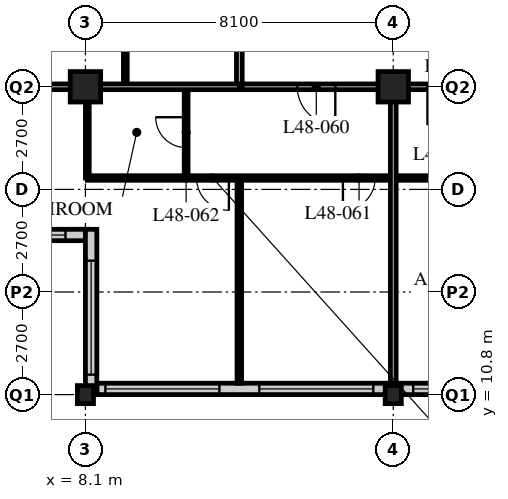
"""IFC4 building model, lengths in metres.
Left out: names, types, materials, properties, quantities, classifications, styles, units other than length and angle.
Written with IfcOpenShell. Run it as: python <this file> out.ifc"""

import sys

from ifc_helpers import new_model, si_unit, direction, frame, frame_2d, origin, origin_2d, place, context, subcontext, project, spatial, rectangle, hollow_rectangle, i_section, extrude, element, fill, save


model = new_model("IFC4")
c1 = context("Model", 3, precision=1e-05, world=origin(), true_north=direction((0.0, 1.0)))
c2 = subcontext(c1, "Body", "Model", "MODEL_VIEW")
j1 = project(units=[si_unit("LENGTHUNIT", "METRE"), si_unit("PLANEANGLEUNIT", "RADIAN")], contexts=[c1])
p1 = place(None, origin())
s1 = spatial("IfcSite", under=j1, at=p1, CompositionType="ELEMENT")
p2 = place(p1, origin())
s2 = spatial("IfcBuilding", under=s1, at=p2, CompositionType="ELEMENT")
p3 = place(p2, frame((0.0, 0.0, 188.4)))
s3 = spatial("IfcBuildingStorey", under=s2, at=p3, CompositionType="ELEMENT", Elevation=188.4)
p4 = place(p3, frame((8.1, 10.8, 0.0), z_axis=(0.0, 0.0, 1.0), x_axis=(1.0, 0.0, 0.0)))
e1 = element("IfcColumn", 1, at=p4, inside=s3, PredefinedType="COLUMN", context=c2, shape_type="SweptSolid", body=[
    extrude(i_section(OverallWidth=0.424, OverallDepth=0.475, WebThickness=0.048, FlangeThickness=0.077, FilletRadius=0.015, at=origin_2d()), origin(), (0.0, 0.0, 1.0), 3.6),
])
p5 = place(p3, frame((8.1, 18.9, 0.0), z_axis=(0.0, 0.0, 1.0), x_axis=(1.0, 0.0, 0.0)))
e2 = element("IfcColumn", 2, at=p5, inside=s3, PredefinedType="COLUMN", context=c2, shape_type="SweptSolid", body=[
    extrude(hollow_rectangle(XDim=0.8, YDim=0.8, WallThickness=0.08, at=origin_2d()), origin(), (0.0, 0.0, 1.0), 3.6),
])
p6 = place(p3, frame((16.2, 10.8, 0.0), z_axis=(0.0, 0.0, 1.0), x_axis=(1.0, 0.0, 0.0)))
e3 = element("IfcColumn", 3, at=p6, inside=s3, PredefinedType="COLUMN", context=c2, shape_type="SweptSolid", body=[
    extrude(i_section(OverallWidth=0.424, OverallDepth=0.475, WebThickness=0.048, FlangeThickness=0.077, FilletRadius=0.015, at=origin_2d()), origin(), (0.0, 0.0, 1.0), 3.6),
])
p7 = place(p3, frame((16.2, 18.9, 0.0), z_axis=(0.0, 0.0, 1.0), x_axis=(1.0, 0.0, 0.0)))
e4 = element("IfcColumn", 4, at=p7, inside=s3, PredefinedType="COLUMN", context=c2, shape_type="SweptSolid", body=[
    extrude(hollow_rectangle(XDim=0.8, YDim=0.8, WallThickness=0.08, at=origin_2d()), origin(), (0.0, 0.0, 1.0), 3.6),
])
p8 = place(p3, frame((8.4, 10.95, 0.0), z_axis=(0.0, 0.0, 1.0), x_axis=(1.0, 0.0, 0.0)))
e5 = element("IfcWall", 5, at=p8, inside=s3, PredefinedType="SOLIDWALL", context=c2, shape_type="SweptSolid", body=[
    extrude(rectangle(XDim=40.2, YDim=0.3, at=frame_2d((20.1, 0.0))), origin(), (0.0, 0.0, 1.0), 3.39),
])
p9 = place(p8, frame((0.225, 0.0, 0.6)))
e6 = element("IfcOpeningElement", 6, at=p9, cuts=e5, PredefinedType="OPENING", context=c2, shape_type="SweptSolid", body=[
    extrude(rectangle(XDim=3.0, YDim=2.4, at=frame_2d((1.5, 1.2))), frame((0.0, 0.16, 0.0), z_axis=(0.0, -1.0, 0.0), x_axis=(1.0, 0.0, 0.0)), (0.0, 0.0, 1.0), 0.32),
])
p10 = place(p8, frame((4.275, 0.0, 0.6)))
e7 = element("IfcOpeningElement", 7, at=p10, cuts=e5, PredefinedType="OPENING", context=c2, shape_type="SweptSolid", body=[
    extrude(rectangle(XDim=3.0, YDim=2.4, at=frame_2d((1.5, 1.2))), frame((0.0, 0.16, 0.0), z_axis=(0.0, -1.0, 0.0), x_axis=(1.0, 0.0, 0.0)), (0.0, 0.0, 1.0), 0.32),
])
p11 = place(p8, frame((8.325, 0.0, 0.6)))
e8 = element("IfcOpeningElement", 8, at=p11, cuts=e5, PredefinedType="OPENING", context=c2, shape_type="SweptSolid", body=[
    extrude(rectangle(XDim=3.0, YDim=2.4, at=frame_2d((1.5, 1.2))), frame((0.0, 0.16, 0.0), z_axis=(0.0, -1.0, 0.0), x_axis=(1.0, 0.0, 0.0)), (0.0, 0.0, 1.0), 0.32),
])
p12 = place(p8, frame((12.375, 0.0, 0.6)))
e9 = element("IfcOpeningElement", 9, at=p12, cuts=e5, PredefinedType="OPENING", context=c2, shape_type="SweptSolid", body=[
    extrude(rectangle(XDim=3.0, YDim=2.4, at=frame_2d((1.5, 1.2))), frame((0.0, 0.16, 0.0), z_axis=(0.0, -1.0, 0.0), x_axis=(1.0, 0.0, 0.0)), (0.0, 0.0, 1.0), 0.32),
])
p13 = place(p8, frame((16.425, 0.0, 0.6)))
e10 = element("IfcOpeningElement", 10, at=p13, cuts=e5, PredefinedType="OPENING", context=c2, shape_type="SweptSolid", body=[
    extrude(rectangle(XDim=3.0, YDim=2.4, at=frame_2d((1.5, 1.2))), frame((0.0, 0.16, 0.0), z_axis=(0.0, -1.0, 0.0), x_axis=(1.0, 0.0, 0.0)), (0.0, 0.0, 1.0), 0.32),
])
p14 = place(p8, frame((20.475, 0.0, 0.6)))
e11 = element("IfcOpeningElement", 11, at=p14, cuts=e5, PredefinedType="OPENING", context=c2, shape_type="SweptSolid", body=[
    extrude(rectangle(XDim=3.0, YDim=2.4, at=frame_2d((1.5, 1.2))), frame((0.0, 0.16, 0.0), z_axis=(0.0, -1.0, 0.0), x_axis=(1.0, 0.0, 0.0)), (0.0, 0.0, 1.0), 0.32),
])
p15 = place(p8, frame((24.525, 0.0, 0.6)))
e12 = element("IfcOpeningElement", 12, at=p15, cuts=e5, PredefinedType="OPENING", context=c2, shape_type="SweptSolid", body=[
    extrude(rectangle(XDim=3.0, YDim=2.4, at=frame_2d((1.5, 1.2))), frame((0.0, 0.16, 0.0), z_axis=(0.0, -1.0, 0.0), x_axis=(1.0, 0.0, 0.0)), (0.0, 0.0, 1.0), 0.32),
])
p16 = place(p8, frame((28.575, 0.0, 0.6)))
e13 = element("IfcOpeningElement", 13, at=p16, cuts=e5, PredefinedType="OPENING", context=c2, shape_type="SweptSolid", body=[
    extrude(rectangle(XDim=3.0, YDim=2.4, at=frame_2d((1.5, 1.2))), frame((0.0, 0.16, 0.0), z_axis=(0.0, -1.0, 0.0), x_axis=(1.0, 0.0, 0.0)), (0.0, 0.0, 1.0), 0.32),
])
p17 = place(p8, frame((32.625, 0.0, 0.6)))
e14 = element("IfcOpeningElement", 14, at=p17, cuts=e5, PredefinedType="OPENING", context=c2, shape_type="SweptSolid", body=[
    extrude(rectangle(XDim=3.0, YDim=2.4, at=frame_2d((1.5, 1.2))), frame((0.0, 0.16, 0.0), z_axis=(0.0, -1.0, 0.0), x_axis=(1.0, 0.0, 0.0)), (0.0, 0.0, 1.0), 0.32),
])
p18 = place(p8, frame((36.675, 0.0, 0.6)))
e15 = element("IfcOpeningElement", 15, at=p18, cuts=e5, PredefinedType="OPENING", context=c2, shape_type="SweptSolid", body=[
    extrude(rectangle(XDim=3.0, YDim=2.4, at=frame_2d((1.5, 1.2))), frame((0.0, 0.16, 0.0), z_axis=(0.0, -1.0, 0.0), x_axis=(1.0, 0.0, 0.0)), (0.0, 0.0, 1.0), 0.32),
])
p19 = place(p3, frame((4.35, 15.0, 0.0), z_axis=(0.0, 0.0, 1.0), x_axis=(1.0, 0.0, 0.0)))
e16 = element("IfcWall", 16, at=p19, inside=s3, PredefinedType="SOLIDWALL", context=c2, shape_type="SweptSolid", body=[
    extrude(rectangle(XDim=3.75, YDim=0.3, at=frame_2d((1.875, 0.0))), origin(), (0.0, 0.0, 1.0), 3.39),
])
p20 = place(p19, frame((0.225, 0.0, 0.6)))
e17 = element("IfcOpeningElement", 17, at=p20, cuts=e16, PredefinedType="OPENING", context=c2, shape_type="SweptSolid", body=[
    extrude(rectangle(XDim=3.0, YDim=2.0, at=frame_2d((1.5, 1.0))), frame((0.0, 0.16, 0.0), z_axis=(0.0, -1.0, 0.0), x_axis=(1.0, 0.0, 0.0)), (0.0, 0.0, 1.0), 0.32),
])
p21 = place(p3, frame((8.25, 15.15, 0.0), z_axis=(0.0, 0.0, 1.0), x_axis=(0.0, -1.0, 0.0)))
e18 = element("IfcWall", 18, at=p21, inside=s3, PredefinedType="SOLIDWALL", context=c2, shape_type="SweptSolid", body=[
    extrude(rectangle(XDim=4.35, YDim=0.3, at=frame_2d((2.175, 0.0))), origin(), (0.0, 0.0, 1.0), 3.39),
])
p22 = place(p21, frame((0.825, 0.0, 0.6)))
e19 = element("IfcOpeningElement", 19, at=p22, cuts=e18, PredefinedType="OPENING", context=c2, shape_type="SweptSolid", body=[
    extrude(rectangle(XDim=3.0, YDim=2.0, at=frame_2d((1.5, 1.0))), frame((0.0, 0.16, 0.0), z_axis=(0.0, -1.0, 0.0), x_axis=(1.0, 0.0, 0.0)), (0.0, 0.0, 1.0), 0.32),
])
p23 = place(p3, frame((12.15, 18.9, 0.0), z_axis=(0.0, 0.0, 1.0), x_axis=(1.0, 0.0, 0.0)))
e20 = element("IfcWall", 20, at=p23, inside=s3, PredefinedType="PARTITIONING", context=c2, shape_type="SweptSolid", body=[
    extrude(rectangle(XDim=32.4, YDim=0.15, at=frame_2d((16.2, 0.0))), origin(), (0.0, 0.0, 1.0), 2.778),
])
p24 = place(p23, frame((4.95, 0.0, 0.0)))
e21 = element("IfcOpeningElement", 21, at=p24, cuts=e20, PredefinedType="OPENING", context=c2, shape_type="SweptSolid", body=[
    extrude(rectangle(XDim=1.0, YDim=2.1, at=frame_2d((0.5, 1.05))), frame((0.0, 0.085, 0.0), z_axis=(0.0, -1.0, 0.0), x_axis=(1.0, 0.0, 0.0)), (0.0, 0.0, 1.0), 0.17),
])
p25 = place(p23, frame((13.05, 0.0, 0.0)))
e22 = element("IfcOpeningElement", 22, at=p25, cuts=e20, PredefinedType="OPENING", context=c2, shape_type="SweptSolid", body=[
    extrude(rectangle(XDim=1.0, YDim=2.1, at=frame_2d((0.5, 1.05))), frame((0.0, 0.085, 0.0), z_axis=(0.0, -1.0, 0.0), x_axis=(1.0, 0.0, 0.0)), (0.0, 0.0, 1.0), 0.17),
])
p26 = place(p23, frame((21.15, 0.0, 0.0)))
e23 = element("IfcOpeningElement", 23, at=p26, cuts=e20, PredefinedType="OPENING", context=c2, shape_type="SweptSolid", body=[
    extrude(rectangle(XDim=1.0, YDim=2.1, at=frame_2d((0.5, 1.05))), frame((0.0, 0.085, 0.0), z_axis=(0.0, -1.0, 0.0), x_axis=(1.0, 0.0, 0.0)), (0.0, 0.0, 1.0), 0.17),
])
p27 = place(p23, frame((1.525, 0.0, 0.0)))
e24 = element("IfcOpeningElement", 24, at=p27, cuts=e20, PredefinedType="OPENING", context=c2, shape_type="SweptSolid", body=[
    extrude(rectangle(XDim=1.0, YDim=2.1, at=frame_2d((0.5, 1.05))), frame((0.0, 0.085, 0.0), z_axis=(0.0, -1.0, 0.0), x_axis=(1.0, 0.0, 0.0)), (0.0, 0.0, 1.0), 0.17),
])
p28 = place(p23, frame((29.875, 0.0, 0.0)))
e25 = element("IfcOpeningElement", 25, at=p28, cuts=e20, PredefinedType="OPENING", context=c2, shape_type="SweptSolid", body=[
    extrude(rectangle(XDim=1.0, YDim=2.1, at=frame_2d((0.5, 1.05))), frame((0.0, 0.085, 0.0), z_axis=(0.0, -1.0, 0.0), x_axis=(1.0, 0.0, 0.0)), (0.0, 0.0, 1.0), 0.17),
])
p29 = place(p3, frame((12.15, 18.9, 0.0), z_axis=(0.0, 0.0, 1.0), x_axis=(0.0, 1.0, 0.0)))
e26 = element("IfcWall", 26, at=p29, inside=s3, PredefinedType="PARTITIONING", context=c2, shape_type="SweptSolid", body=[
    extrude(rectangle(XDim=28.35, YDim=0.15, at=frame_2d((14.175, 0.0))), origin(), (0.0, 0.0, 1.0), 3.39),
])
p30 = place(p29, frame((2.35, 0.0, 0.0)))
e27 = element("IfcOpeningElement", 27, at=p30, cuts=e26, PredefinedType="OPENING", context=c2, shape_type="SweptSolid", body=[
    extrude(rectangle(XDim=1.0, YDim=2.1, at=frame_2d((0.5, 1.05))), frame((0.0, 0.085, 0.0), z_axis=(0.0, -1.0, 0.0), x_axis=(1.0, 0.0, 0.0)), (0.0, 0.0, 1.0), 0.17),
])
p31 = place(p29, frame((6.4, 0.0, 0.0)))
e28 = element("IfcOpeningElement", 28, at=p31, cuts=e26, PredefinedType="OPENING", context=c2, shape_type="SweptSolid", body=[
    extrude(rectangle(XDim=1.0, YDim=2.1, at=frame_2d((0.5, 1.05))), frame((0.0, 0.085, 0.0), z_axis=(0.0, -1.0, 0.0), x_axis=(1.0, 0.0, 0.0)), (0.0, 0.0, 1.0), 0.17),
])
p32 = place(p29, frame((8.5, 0.0, 0.0)))
e29 = element("IfcOpeningElement", 29, at=p32, cuts=e26, PredefinedType="OPENING", context=c2, shape_type="SweptSolid", body=[
    extrude(rectangle(XDim=1.0, YDim=2.1, at=frame_2d((0.5, 1.05))), frame((0.0, 0.085, 0.0), z_axis=(0.0, -1.0, 0.0), x_axis=(1.0, 0.0, 0.0)), (0.0, 0.0, 1.0), 0.17),
])
p33 = place(p29, frame((16.6, 0.0, 0.0)))
e30 = element("IfcOpeningElement", 30, at=p33, cuts=e26, PredefinedType="OPENING", context=c2, shape_type="SweptSolid", body=[
    extrude(rectangle(XDim=1.0, YDim=2.1, at=frame_2d((0.5, 1.05))), frame((0.0, 0.085, 0.0), z_axis=(0.0, -1.0, 0.0), x_axis=(1.0, 0.0, 0.0)), (0.0, 0.0, 1.0), 0.17),
])
p34 = place(p29, frame((26.65, 0.0, 0.0)))
e31 = element("IfcOpeningElement", 31, at=p34, cuts=e26, PredefinedType="OPENING", context=c2, shape_type="SweptSolid", body=[
    extrude(rectangle(XDim=1.0, YDim=2.1, at=frame_2d((0.5, 1.05))), frame((0.0, 0.085, 0.0), z_axis=(0.0, -1.0, 0.0), x_axis=(1.0, 0.0, 0.0)), (0.0, 0.0, 1.0), 0.17),
])
p35 = place(p3, frame((9.15, 18.9, 0.0), z_axis=(0.0, 0.0, 1.0), x_axis=(0.0, 1.0, 0.0)))
e32 = element("IfcWall", 32, at=p35, inside=s3, PredefinedType="PARTITIONING", context=c2, shape_type="SweptSolid", body=[
    extrude(rectangle(XDim=2.2, YDim=0.1, at=frame_2d((1.1, 0.0))), origin(), (0.0, 0.0, 1.0), 3.39),
])
p36 = place(p3, frame((10.75, 18.9, 0.0), z_axis=(0.0, 0.0, 1.0), x_axis=(0.0, -1.0, 0.0)))
e33 = element("IfcWall", 33, at=p36, inside=s3, PredefinedType="PARTITIONING", context=c2, shape_type="SweptSolid", body=[
    extrude(rectangle(XDim=2.4, YDim=0.1, at=frame_2d((1.2, 0.0))), origin(), (0.0, 0.0, 1.0), 3.39),
])
p37 = place(p36, frame((0.8, 0.0, 0.0)))
e34 = element("IfcOpeningElement", 34, at=p37, cuts=e33, PredefinedType="OPENING", context=c2, shape_type="SweptSolid", body=[
    extrude(rectangle(XDim=0.8, YDim=2.1, at=frame_2d((0.4, 1.05))), frame((0.0, 0.06, 0.0), z_axis=(0.0, -1.0, 0.0), x_axis=(1.0, 0.0, 0.0)), (0.0, 0.0, 1.0), 0.12),
])
p38 = place(p3, frame((8.15, 18.9, 0.0), z_axis=(0.0, 0.0, 1.0), x_axis=(0.0, -1.0, 0.0)))
e35 = element("IfcWall", 35, at=p38, inside=s3, PredefinedType="PARTITIONING", context=c2, shape_type="SweptSolid", body=[
    extrude(rectangle(XDim=2.4, YDim=0.1, at=frame_2d((1.2, 0.0))), origin(), (0.0, 0.0, 1.0), 2.778),
])
p39 = place(p3, frame((8.15, 16.5, 0.0), z_axis=(0.0, 0.0, 1.0), x_axis=(1.0, 0.0, 0.0)))
e36 = element("IfcWall", 36, at=p39, inside=s3, PredefinedType="PARTITIONING", context=c2, shape_type="SweptSolid", body=[
    extrude(rectangle(XDim=40.4, YDim=0.12, at=frame_2d((20.2, 0.0))), origin(), (0.0, 0.0, 1.0), 3.39),
])
p40 = place(p39, frame((9.025, 0.0, 0.0)))
e37 = element("IfcOpeningElement", 37, at=p40, cuts=e36, PredefinedType="OPENING", context=c2, shape_type="SweptSolid", body=[
    extrude(rectangle(XDim=0.85, YDim=2.1, at=frame_2d((0.425, 1.05))), frame((0.0, 0.07, 0.0), z_axis=(0.0, -1.0, 0.0), x_axis=(1.0, 0.0, 0.0)), (0.0, 0.0, 1.0), 0.14),
])
p41 = place(p39, frame((12.425, 0.0, 0.0)))
e38 = element("IfcOpeningElement", 38, at=p41, cuts=e36, PredefinedType="OPENING", context=c2, shape_type="SweptSolid", body=[
    extrude(rectangle(XDim=0.85, YDim=2.1, at=frame_2d((0.425, 1.05))), frame((0.0, 0.07, 0.0), z_axis=(0.0, -1.0, 0.0), x_axis=(1.0, 0.0, 0.0)), (0.0, 0.0, 1.0), 0.14),
])
p42 = place(p39, frame((17.125, 0.0, 0.0)))
e39 = element("IfcOpeningElement", 39, at=p42, cuts=e36, PredefinedType="OPENING", context=c2, shape_type="SweptSolid", body=[
    extrude(rectangle(XDim=0.85, YDim=2.1, at=frame_2d((0.425, 1.05))), frame((0.0, 0.07, 0.0), z_axis=(0.0, -1.0, 0.0), x_axis=(1.0, 0.0, 0.0)), (0.0, 0.0, 1.0), 0.14),
])
p43 = place(p39, frame((20.525, 0.0, 0.0)))
e40 = element("IfcOpeningElement", 40, at=p43, cuts=e36, PredefinedType="OPENING", context=c2, shape_type="SweptSolid", body=[
    extrude(rectangle(XDim=0.85, YDim=2.1, at=frame_2d((0.425, 1.05))), frame((0.0, 0.07, 0.0), z_axis=(0.0, -1.0, 0.0), x_axis=(1.0, 0.0, 0.0)), (0.0, 0.0, 1.0), 0.14),
])
p44 = place(p39, frame((25.225, 0.0, 0.0)))
e41 = element("IfcOpeningElement", 41, at=p44, cuts=e36, PredefinedType="OPENING", context=c2, shape_type="SweptSolid", body=[
    extrude(rectangle(XDim=0.85, YDim=2.1, at=frame_2d((0.425, 1.05))), frame((0.0, 0.07, 0.0), z_axis=(0.0, -1.0, 0.0), x_axis=(1.0, 0.0, 0.0)), (0.0, 0.0, 1.0), 0.14),
])
p45 = place(p39, frame((28.625, 0.0, 0.0)))
e42 = element("IfcOpeningElement", 42, at=p45, cuts=e36, PredefinedType="OPENING", context=c2, shape_type="SweptSolid", body=[
    extrude(rectangle(XDim=0.85, YDim=2.1, at=frame_2d((0.425, 1.05))), frame((0.0, 0.07, 0.0), z_axis=(0.0, -1.0, 0.0), x_axis=(1.0, 0.0, 0.0)), (0.0, 0.0, 1.0), 0.14),
])
p46 = place(p39, frame((6.725, 0.0, 0.0)))
e43 = element("IfcOpeningElement", 43, at=p46, cuts=e36, PredefinedType="OPENING", context=c2, shape_type="SweptSolid", body=[
    extrude(rectangle(XDim=0.85, YDim=2.1, at=frame_2d((0.425, 1.05))), frame((0.0, 0.07, 0.0), z_axis=(0.0, -1.0, 0.0), x_axis=(1.0, 0.0, 0.0)), (0.0, 0.0, 1.0), 0.14),
])
p47 = place(p39, frame((2.875, 0.0, 0.0)))
e44 = element("IfcOpeningElement", 44, at=p47, cuts=e36, PredefinedType="OPENING", context=c2, shape_type="SweptSolid", body=[
    extrude(rectangle(XDim=0.85, YDim=2.1, at=frame_2d((0.425, 1.05))), frame((0.0, 0.07, 0.0), z_axis=(0.0, -1.0, 0.0), x_axis=(1.0, 0.0, 0.0)), (0.0, 0.0, 1.0), 0.14),
])
p48 = place(p39, frame((32.825, 0.0, 0.0)))
e45 = element("IfcOpeningElement", 45, at=p48, cuts=e36, PredefinedType="OPENING", context=c2, shape_type="SweptSolid", body=[
    extrude(rectangle(XDim=0.85, YDim=2.1, at=frame_2d((0.425, 1.05))), frame((0.0, 0.07, 0.0), z_axis=(0.0, -1.0, 0.0), x_axis=(1.0, 0.0, 0.0)), (0.0, 0.0, 1.0), 0.14),
])
p49 = place(p39, frame((36.675, 0.0, 0.0)))
e46 = element("IfcOpeningElement", 46, at=p49, cuts=e36, PredefinedType="OPENING", context=c2, shape_type="SweptSolid", body=[
    extrude(rectangle(XDim=0.85, YDim=2.1, at=frame_2d((0.425, 1.05))), frame((0.0, 0.07, 0.0), z_axis=(0.0, -1.0, 0.0), x_axis=(1.0, 0.0, 0.0)), (0.0, 0.0, 1.0), 0.14),
])
p50 = place(p3, frame((12.15, 16.5, 0.0), z_axis=(0.0, 0.0, 1.0), x_axis=(0.0, -1.0, 0.0)))
e47 = element("IfcWall", 47, at=p50, inside=s3, PredefinedType="PARTITIONING", context=c2, shape_type="SweptSolid", body=[
    extrude(rectangle(XDim=5.4, YDim=0.12, at=frame_2d((2.7, 0.0))), origin(), (0.0, 0.0, 1.0), 3.39),
])
for number, where, z_axis, x_axis in (
    (48, (4.35, 18.9, 0.0), (0.0, 0.0, 1.0), (1.0, 0.0, 0.0)),
    (49, (16.2, 18.9, 0.0), (0.0, 0.0, 1.0), (0.0, -1.0, 0.0)),
):
    element("IfcWall", number, at=place(p3, frame(where, z_axis=z_axis, x_axis=x_axis)), inside=s3, PredefinedType="PARTITIONING", context=c2, shape_type="SweptSolid", body=[
        extrude(rectangle(XDim=7.8, YDim=0.15, at=frame_2d((3.9, 0.0))), origin(), (0.0, 0.0, 1.0), 2.778),
    ])
p51 = place(p9, origin())
e50 = element("IfcWindow", 50, at=p51, inside=s3, PartitioningType="SINGLE_PANEL", PredefinedType="WINDOW", context=c2, shape_type="SweptSolid", body=[
    extrude(rectangle(XDim=3.0, YDim=2.4, at=frame_2d((1.5, 1.2))), frame((0.0, 0.03, 0.0), z_axis=(0.0, -1.0, 0.0), x_axis=(1.0, 0.0, 0.0)), (0.0, 0.0, 1.0), 0.06),
])
fill(e6, e50)
p52 = place(p10, origin())
e51 = element("IfcWindow", 51, at=p52, inside=s3, PartitioningType="SINGLE_PANEL", PredefinedType="WINDOW", context=c2, shape_type="SweptSolid", body=[
    extrude(rectangle(XDim=3.0, YDim=2.4, at=frame_2d((1.5, 1.2))), frame((0.0, 0.03, 0.0), z_axis=(0.0, -1.0, 0.0), x_axis=(1.0, 0.0, 0.0)), (0.0, 0.0, 1.0), 0.06),
])
fill(e7, e51)
p53 = place(p11, origin())
e52 = element("IfcWindow", 52, at=p53, inside=s3, PartitioningType="SINGLE_PANEL", PredefinedType="WINDOW", context=c2, shape_type="SweptSolid", body=[
    extrude(rectangle(XDim=3.0, YDim=2.4, at=frame_2d((1.5, 1.2))), frame((0.0, 0.03, 0.0), z_axis=(0.0, -1.0, 0.0), x_axis=(1.0, 0.0, 0.0)), (0.0, 0.0, 1.0), 0.06),
])
fill(e8, e52)
p54 = place(p20, origin())
e53 = element("IfcWindow", 53, at=p54, inside=s3, PartitioningType="SINGLE_PANEL", PredefinedType="WINDOW", context=c2, shape_type="SweptSolid", body=[
    extrude(rectangle(XDim=3.0, YDim=2.0, at=frame_2d((1.5, 1.0))), frame((0.0, 0.03, 0.0), z_axis=(0.0, -1.0, 0.0), x_axis=(1.0, 0.0, 0.0)), (0.0, 0.0, 1.0), 0.06),
])
fill(e17, e53)
p55 = place(p22, origin())
e54 = element("IfcWindow", 54, at=p55, inside=s3, PartitioningType="SINGLE_PANEL", PredefinedType="WINDOW", context=c2, shape_type="SweptSolid", body=[
    extrude(rectangle(XDim=3.0, YDim=2.0, at=frame_2d((1.5, 1.0))), frame((0.0, 0.03, 0.0), z_axis=(0.0, -1.0, 0.0), x_axis=(1.0, 0.0, 0.0)), (0.0, 0.0, 1.0), 0.06),
])
fill(e19, e54)
p56 = place(p24, origin())
e55 = element("IfcDoor", 55, at=p56, inside=s3, OperationType="SINGLE_SWING_RIGHT", PredefinedType="DOOR", context=c2, shape_type="SweptSolid", body=[
    extrude(rectangle(XDim=1.0, YDim=2.1, at=frame_2d((0.5, 1.05))), frame((0.0, 0.025, 0.0), z_axis=(0.0, -1.0, 0.0), x_axis=(1.0, 0.0, 0.0)), (0.0, 0.0, 1.0), 0.05),
])
fill(e21, e55)
p57 = place(p27, origin())
e56 = element("IfcDoor", 56, at=p57, inside=s3, OperationType="SINGLE_SWING_LEFT", PredefinedType="DOOR", context=c2, shape_type="SweptSolid", body=[
    extrude(rectangle(XDim=1.0, YDim=2.1, at=frame_2d((0.5, 1.05))), frame((0.0, 0.025, 0.0), z_axis=(0.0, -1.0, 0.0), x_axis=(1.0, 0.0, 0.0)), (0.0, 0.0, 1.0), 0.05),
])
fill(e24, e56)
p58 = place(p46, origin())
e57 = element("IfcDoor", 57, at=p58, inside=s3, OperationType="SINGLE_SWING_RIGHT", PredefinedType="DOOR", context=c2, shape_type="SweptSolid", body=[
    extrude(rectangle(XDim=0.85, YDim=2.1, at=frame_2d((0.425, 1.05))), frame((0.0, 0.025, 0.0), z_axis=(0.0, -1.0, 0.0), x_axis=(1.0, 0.0, 0.0)), (0.0, 0.0, 1.0), 0.05),
])
fill(e43, e57)
p59 = place(p37, origin())
e58 = element("IfcDoor", 58, at=p59, inside=s3, OperationType="SINGLE_SWING_RIGHT", PredefinedType="DOOR", context=c2, shape_type="SweptSolid", body=[
    extrude(rectangle(XDim=0.8, YDim=2.1, at=frame_2d((0.4, 1.05))), frame((0.0, 0.025, 0.0), z_axis=(0.0, -1.0, 0.0), x_axis=(1.0, 0.0, 0.0)), (0.0, 0.0, 1.0), 0.05),
])
fill(e34, e58)
p60 = place(p47, origin())
e59 = element("IfcDoor", 59, at=p60, inside=s3, OperationType="SINGLE_SWING_LEFT", PredefinedType="DOOR", context=c2, shape_type="SweptSolid", body=[
    extrude(rectangle(XDim=0.85, YDim=2.1, at=frame_2d((0.425, 1.05))), frame((0.0, 0.025, 0.0), z_axis=(0.0, -1.0, 0.0), x_axis=(1.0, 0.0, 0.0)), (0.0, 0.0, 1.0), 0.05),
])
fill(e44, e59)
save(model, sys.argv[1])
